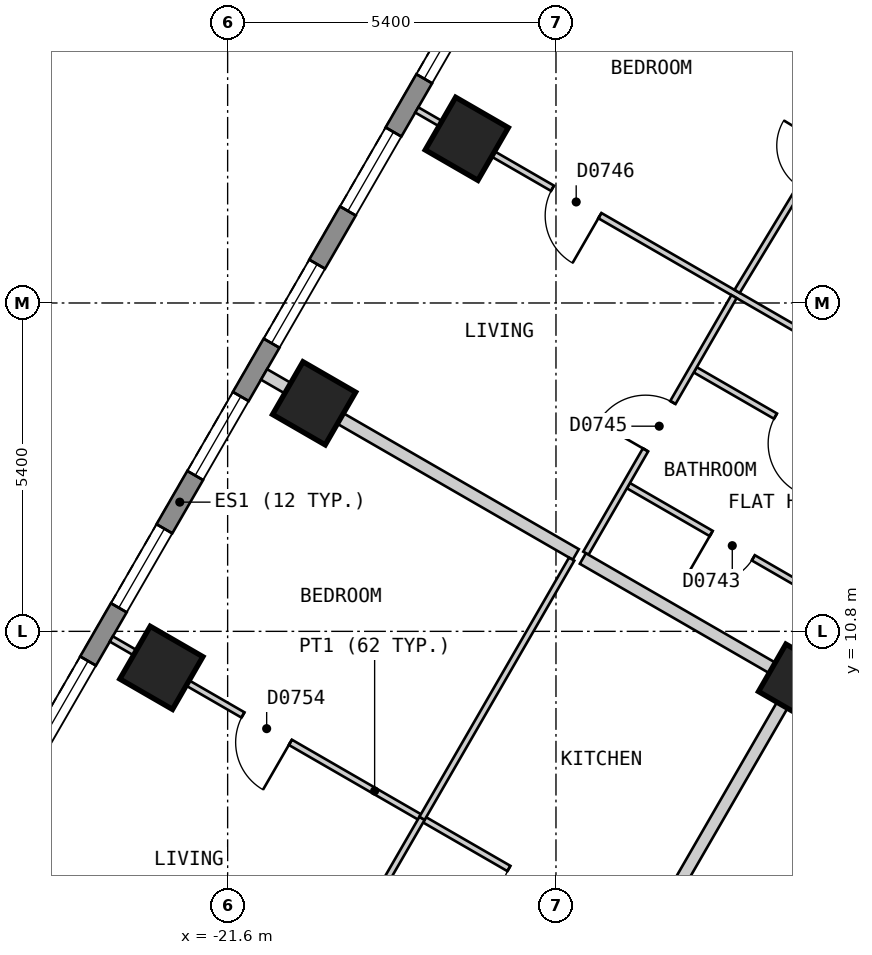
"""IFC4 building model, lengths in metres.
Left out: names, types, materials, properties, quantities, classifications, styles, units other than length and angle.
Written with IfcOpenShell. Run it as: python <this file> out.ifc"""

import sys

from ifc_helpers import new_model, si_unit, direction, frame, frame_2d, origin, origin_2d, place, context, subcontext, project, spatial, polyline, rectangle, outline, extrude, element, fill, save


model = new_model("IFC4")
c1 = context("Model", 3, precision=1e-05, world=origin(), true_north=direction((0.0, 1.0)))
c2 = subcontext(c1, "Body", "Model", "MODEL_VIEW")
j1 = project(units=[si_unit("LENGTHUNIT", "METRE"), si_unit("PLANEANGLEUNIT", "RADIAN")], contexts=[c1])
p1 = place(None, origin())
s1 = spatial("IfcSite", under=j1, at=p1, CompositionType="ELEMENT")
p2 = place(p1, origin())
s2 = spatial("IfcBuilding", under=s1, at=p2, CompositionType="ELEMENT")
p3 = place(p2, frame((0.0, 0.0, 105.0)))
s3 = spatial("IfcBuildingStorey", under=s2, at=p3, CompositionType="ELEMENT", Elevation=105.0)
for number, where, z_axis, x_axis in (
    (1, (-17.667, 18.9, 0.0), (0.0, 0.0, 1.0), (-0.5, -0.866, 0.0)),
    (2, (-20.178, 14.55, 0.0), (0.0, 0.0, 1.0), (-0.5, -0.866, 0.0)),
    (3, (-22.69, 10.2, 0.0), (0.0, 0.0, 1.0), (-0.5, -0.866, 0.0)),
):
    element("IfcColumn", number, at=place(p3, frame(where, z_axis=z_axis, x_axis=x_axis)), inside=s3, PredefinedType="COLUMN", context=c2, shape_type="SweptSolid", body=[
        extrude(rectangle(XDim=1.0, YDim=1.0, at=origin_2d()), origin(), (0.0, 0.0, 1.0), 3.0),
    ])
p4 = place(p3, frame((-12.254, 9.975, 0.0), z_axis=(0.0, 0.0, 1.0), x_axis=(-0.5, -0.866025403784, 0.0)))
e4 = element("IfcColumn", 4, at=p4, inside=s3, PredefinedType="COLUMN", context=c2, shape_type="SweptSolid", body=[
    extrude(rectangle(XDim=0.9, YDim=0.9, at=origin_2d()), origin(), (0.0, 0.0, 1.0), 3.0),
])
p5 = place(p3, frame((-15.747, 24.425, 0.0), z_axis=(0.0, 0.0, 1.0), x_axis=(-0.500027479704, -0.866009537788, 0.0)))
e5 = element("IfcWall", 5, at=p5, inside=s3, PredefinedType="SOLIDWALL", context=c2, shape_type="SweptSolid", body=[
    extrude(outline(polyline([(0.0, -0.15), (26.559, -0.15), (26.478, 0.15), (0.08, 0.15), (0.0, -0.15)])), origin(), (0.0, 0.0, 1.0), 2.6),
])
p6 = place(p5, frame((1.227, 0.0, 0.15)))
e6 = element("IfcOpeningElement", 6, at=p6, cuts=e5, PredefinedType="OPENING", context=c2, shape_type="SweptSolid", body=[
    extrude(rectangle(XDim=1.5, YDim=2.1, at=frame_2d((0.75, 1.05))), frame((0.0, 0.16, 0.0), z_axis=(0.0, -1.0, 0.0), x_axis=(1.0, 0.0, 0.0)), (0.0, 0.0, 1.0), 0.32),
])
p7 = place(p5, frame((3.739, 0.0, 0.15)))
e7 = element("IfcOpeningElement", 7, at=p7, cuts=e5, PredefinedType="OPENING", context=c2, shape_type="SweptSolid", body=[
    extrude(rectangle(XDim=1.5, YDim=2.1, at=frame_2d((0.75, 1.05))), frame((0.0, 0.16, 0.0), z_axis=(0.0, -1.0, 0.0), x_axis=(1.0, 0.0, 0.0)), (0.0, 0.0, 1.0), 0.32),
])
p8 = place(p5, frame((6.25, 0.0, 0.15)))
e8 = element("IfcOpeningElement", 8, at=p8, cuts=e5, PredefinedType="OPENING", context=c2, shape_type="SweptSolid", body=[
    extrude(rectangle(XDim=1.5, YDim=2.1, at=frame_2d((0.75, 1.05))), frame((0.0, 0.16, 0.0), z_axis=(0.0, -1.0, 0.0), x_axis=(1.0, 0.0, 0.0)), (0.0, 0.0, 1.0), 0.32),
])
p9 = place(p5, frame((8.761, 0.0, 0.15)))
e9 = element("IfcOpeningElement", 9, at=p9, cuts=e5, PredefinedType="OPENING", context=c2, shape_type="SweptSolid", body=[
    extrude(rectangle(XDim=1.5, YDim=2.1, at=frame_2d((0.75, 1.05))), frame((0.0, 0.16, 0.0), z_axis=(0.0, -1.0, 0.0), x_axis=(1.0, 0.0, 0.0)), (0.0, 0.0, 1.0), 0.32),
])
p10 = place(p5, frame((11.273, 0.0, 0.15)))
e10 = element("IfcOpeningElement", 10, at=p10, cuts=e5, PredefinedType="OPENING", context=c2, shape_type="SweptSolid", body=[
    extrude(rectangle(XDim=1.5, YDim=2.1, at=frame_2d((0.75, 1.05))), frame((0.0, 0.16, 0.0), z_axis=(0.0, -1.0, 0.0), x_axis=(1.0, 0.0, 0.0)), (0.0, 0.0, 1.0), 0.32),
])
p11 = place(p5, frame((13.785, 0.0, 0.15)))
e11 = element("IfcOpeningElement", 11, at=p11, cuts=e5, PredefinedType="OPENING", context=c2, shape_type="SweptSolid", body=[
    extrude(rectangle(XDim=1.5, YDim=2.1, at=frame_2d((0.75, 1.05))), frame((0.0, 0.16, 0.0), z_axis=(0.0, -1.0, 0.0), x_axis=(1.0, 0.0, 0.0)), (0.0, 0.0, 1.0), 0.32),
])
p12 = place(p5, frame((16.296, 0.0, 0.15)))
e12 = element("IfcOpeningElement", 12, at=p12, cuts=e5, PredefinedType="OPENING", context=c2, shape_type="SweptSolid", body=[
    extrude(rectangle(XDim=1.5, YDim=2.1, at=frame_2d((0.75, 1.05))), frame((0.0, 0.16, 0.0), z_axis=(0.0, -1.0, 0.0), x_axis=(1.0, 0.0, 0.0)), (0.0, 0.0, 1.0), 0.32),
])
p13 = place(p5, frame((18.807, 0.0, 0.15)))
e13 = element("IfcOpeningElement", 13, at=p13, cuts=e5, PredefinedType="OPENING", context=c2, shape_type="SweptSolid", body=[
    extrude(rectangle(XDim=1.5, YDim=2.1, at=frame_2d((0.75, 1.05))), frame((0.0, 0.16, 0.0), z_axis=(0.0, -1.0, 0.0), x_axis=(1.0, 0.0, 0.0)), (0.0, 0.0, 1.0), 0.32),
])
p14 = place(p5, frame((21.319, 0.0, 0.15)))
e14 = element("IfcOpeningElement", 14, at=p14, cuts=e5, PredefinedType="OPENING", context=c2, shape_type="SweptSolid", body=[
    extrude(rectangle(XDim=1.5, YDim=2.1, at=frame_2d((0.75, 1.05))), frame((0.0, 0.16, 0.0), z_axis=(0.0, -1.0, 0.0), x_axis=(1.0, 0.0, 0.0)), (0.0, 0.0, 1.0), 0.32),
])
p15 = place(p5, frame((23.831, 0.0, 0.15)))
e15 = element("IfcOpeningElement", 15, at=p15, cuts=e5, PredefinedType="OPENING", context=c2, shape_type="SweptSolid", body=[
    extrude(rectangle(XDim=1.5, YDim=2.1, at=frame_2d((0.75, 1.05))), frame((0.0, 0.16, 0.0), z_axis=(0.0, -1.0, 0.0), x_axis=(1.0, 0.0, 0.0)), (0.0, 0.0, 1.0), 0.32),
])
p16 = place(p3, frame((-16.05, -1.0, 0.0), z_axis=(0.0, 0.0, 1.0), x_axis=(0.499962449088, 0.866047082728, 0.0)))
e16 = element("IfcWall", 16, at=p16, inside=s3, PredefinedType="PARTITIONING", context=c2, shape_type="SweptSolid", body=[
    extrude(rectangle(XDim=10.391, YDim=0.2, at=frame_2d((5.195, 0.0))), origin(), (0.0, 0.0, 1.0), 2.6),
])
p17 = place(p16, frame((4.745, 0.0, 0.0)))
e17 = element("IfcOpeningElement", 17, at=p17, cuts=e16, PredefinedType="OPENING", context=c2, shape_type="SweptSolid", body=[
    extrude(rectangle(XDim=0.9, YDim=2.1, at=frame_2d((0.45, 1.05))), frame((0.0, 0.11, 0.0), z_axis=(0.0, -1.0, 0.0), x_axis=(1.0, 0.0, 0.0)), (0.0, 0.0, 1.0), 0.22),
])
p18 = place(p3, frame((-18.533, -0.901, 0.0), z_axis=(0.0, 0.0, 1.0), x_axis=(0.499981198768, 0.866036258409, 0.0)))
e18 = element("IfcWall", 18, at=p18, inside=s3, PredefinedType="PARTITIONING", context=c2, shape_type="SweptSolid", body=[
    extrude(rectangle(XDim=20.093, YDim=0.2, at=frame_2d((10.046, 0.0))), origin(), (0.0, 0.0, 1.0), 2.6),
])
p19 = place(p18, frame((14.57, 0.0, 0.0)))
e19 = element("IfcOpeningElement", 19, at=p19, cuts=e18, PredefinedType="OPENING", context=c2, shape_type="SweptSolid", body=[
    extrude(rectangle(XDim=1.0, YDim=2.1, at=frame_2d((0.5, 1.05))), frame((0.0, 0.11, 0.0), z_axis=(0.0, -1.0, 0.0), x_axis=(1.0, 0.0, 0.0)), (0.0, 0.0, 1.0), 0.22),
])
p20 = place(p18, frame((4.523, 0.0, 0.0)))
e20 = element("IfcOpeningElement", 20, at=p20, cuts=e18, PredefinedType="OPENING", context=c2, shape_type="SweptSolid", body=[
    extrude(rectangle(XDim=1.0, YDim=2.1, at=frame_2d((0.5, 1.05))), frame((0.0, 0.11, 0.0), z_axis=(0.0, -1.0, 0.0), x_axis=(1.0, 0.0, 0.0)), (0.0, 0.0, 1.0), 0.22),
])
p21 = place(p3, frame((-23.513, 10.675, 0.0), z_axis=(0.0, 0.0, 1.0), x_axis=(0.866041268327, -0.499972520799, 0.0)))
e21 = element("IfcWall", 21, at=p21, inside=s3, PredefinedType="PARTITIONING", context=c2, shape_type="SweptSolid", body=[
    extrude(rectangle(XDim=10.0, YDim=0.1, at=frame_2d((5.0, 0.0))), origin(), (0.0, 0.0, 1.0), 2.6),
])
p22 = place(p21, frame((7.55, 0.0, 0.0)))
e22 = element("IfcOpeningElement", 22, at=p22, cuts=e21, PredefinedType="OPENING", context=c2, shape_type="SweptSolid", body=[
    extrude(rectangle(XDim=0.9, YDim=2.1, at=frame_2d((0.45, 1.05))), frame((0.0, 0.06, 0.0), z_axis=(0.0, -1.0, 0.0), x_axis=(1.0, 0.0, 0.0)), (0.0, 0.0, 1.0), 0.12),
])
p23 = place(p21, frame((2.5, 0.0, 0.0)))
e23 = element("IfcOpeningElement", 23, at=p23, cuts=e21, PredefinedType="OPENING", context=c2, shape_type="SweptSolid", body=[
    extrude(rectangle(XDim=0.9, YDim=2.1, at=frame_2d((0.45, 1.05))), frame((0.0, 0.06, 0.0), z_axis=(0.0, -1.0, 0.0), x_axis=(1.0, 0.0, 0.0)), (0.0, 0.0, 1.0), 0.12),
])
p24 = place(p3, frame((-15.009, 13.196, 0.0), z_axis=(0.0, 0.0, 1.0), x_axis=(0.865916335424, -0.500188864377, 0.0)))
e24 = element("IfcWall", 24, at=p24, inside=s3, PredefinedType="PARTITIONING", context=c2, shape_type="SweptSolid", body=[
    extrude(rectangle(XDim=3.896, YDim=0.1, at=frame_2d((1.948, 0.0))), origin(), (0.0, 0.0, 1.0), 2.6),
])
p25 = place(p24, frame((1.573, 0.0, 0.0)))
e25 = element("IfcOpeningElement", 25, at=p25, cuts=e24, PredefinedType="OPENING", context=c2, shape_type="SweptSolid", body=[
    extrude(rectangle(XDim=0.8, YDim=2.1, at=frame_2d((0.4, 1.05))), frame((0.0, 0.06, 0.0), z_axis=(0.0, -1.0, 0.0), x_axis=(1.0, 0.0, 0.0)), (0.0, 0.0, 1.0), 0.12),
])
p26 = place(p3, frame((-13.909, 15.101, 0.0), z_axis=(0.0, 0.0, 1.0), x_axis=(0.866024880635, -0.500000906121, 0.0)))
e26 = element("IfcWall", 26, at=p26, inside=s3, PredefinedType="PARTITIONING", context=c2, shape_type="SweptSolid", body=[
    extrude(rectangle(XDim=3.896, YDim=0.1, at=frame_2d((1.948, 0.0))), origin(), (0.0, 0.0, 1.0), 2.6),
])
p27 = place(p26, frame((1.523, 0.0, 0.0)))
e27 = element("IfcOpeningElement", 27, at=p27, cuts=e26, PredefinedType="OPENING", context=c2, shape_type="SweptSolid", body=[
    extrude(rectangle(XDim=0.9, YDim=2.1, at=frame_2d((0.45, 1.05))), frame((0.0, 0.06, 0.0), z_axis=(0.0, -1.0, 0.0), x_axis=(1.0, 0.0, 0.0)), (0.0, 0.0, 1.0), 0.12),
])
p28 = place(p3, frame((-18.489, 19.375, 0.0), z_axis=(0.0, 0.0, 1.0), x_axis=(0.866016855193, -0.500014806302, 0.0)))
e28 = element("IfcWall", 28, at=p28, inside=s3, PredefinedType="PARTITIONING", context=c2, shape_type="SweptSolid", body=[
    extrude(rectangle(XDim=10.0, YDim=0.1, at=frame_2d((5.0, 0.0))), origin(), (0.0, 0.0, 1.0), 2.6),
])
p29 = place(p28, frame((2.577, 0.0, 0.0)))
e29 = element("IfcOpeningElement", 29, at=p29, cuts=e28, PredefinedType="OPENING", context=c2, shape_type="SweptSolid", body=[
    extrude(rectangle(XDim=0.9, YDim=2.1, at=frame_2d((0.45, 1.05))), frame((0.0, 0.06, 0.0), z_axis=(0.0, -1.0, 0.0), x_axis=(1.0, 0.0, 0.0)), (0.0, 0.0, 1.0), 0.12),
])
p30 = place(p3, frame((-13.221, 16.391, 0.0), z_axis=(0.0, 0.0, 1.0), x_axis=(0.518164725284, 0.855280841286, 0.0)))
e30 = element("IfcWall", 30, at=p30, inside=s3, PredefinedType="PARTITIONING", context=c2, shape_type="SweptSolid", body=[
    extrude(rectangle(XDim=4.74, YDim=0.1, at=frame_2d((2.37, 0.0))), origin(), (0.0, 0.0, 1.0), 2.6),
])
p31 = place(p30, frame((2.002, 0.0, 0.0)))
e31 = element("IfcOpeningElement", 31, at=p31, cuts=e30, PredefinedType="OPENING", context=c2, shape_type="SweptSolid", body=[
    extrude(rectangle(XDim=0.8, YDim=2.1, at=frame_2d((0.4, 1.05))), frame((0.0, 0.06, 0.0), z_axis=(0.0, -1.0, 0.0), x_axis=(1.0, 0.0, 0.0)), (0.0, 0.0, 1.0), 0.12),
])
p32 = place(p3, frame((-15.708, 12.085, 0.0), z_axis=(0.0, 0.0, 1.0), x_axis=(0.499943653708, 0.866057932887, 0.0)))
e32 = element("IfcWall", 32, at=p32, inside=s3, PredefinedType="PARTITIONING", context=c2, shape_type="SweptSolid", body=[
    extrude(rectangle(XDim=4.873, YDim=0.1, at=frame_2d((2.436, 0.0))), origin(), (0.0, 0.0, 1.0), 2.6),
])
p33 = place(p32, frame((1.962, 0.0, 0.0)))
e33 = element("IfcOpeningElement", 33, at=p33, cuts=e32, PredefinedType="OPENING", context=c2, shape_type="SweptSolid", body=[
    extrude(rectangle(XDim=0.9, YDim=2.1, at=frame_2d((0.45, 1.05))), frame((0.0, 0.06, 0.0), z_axis=(0.0, -1.0, 0.0), x_axis=(1.0, 0.0, 0.0)), (0.0, 0.0, 1.0), 0.12),
])
p34 = place(p3, frame((-20.89, 3.418, 0.0), z_axis=(0.0, 0.0, 1.0), x_axis=(0.500014231302, 0.866017187182, 0.0)))
e34 = element("IfcWall", 34, at=p34, inside=s3, PredefinedType="PARTITIONING", context=c2, shape_type="SweptSolid", body=[
    extrude(rectangle(XDim=4.973, YDim=0.1, at=frame_2d((2.487, 0.0))), origin(), (0.0, 0.0, 1.0), 2.6),
])
p35 = place(p34, frame((2.011, 0.0, 0.0)))
e35 = element("IfcOpeningElement", 35, at=p35, cuts=e34, PredefinedType="OPENING", context=c2, shape_type="SweptSolid", body=[
    extrude(rectangle(XDim=0.9, YDim=2.1, at=frame_2d((0.45, 1.05))), frame((0.0, 0.06, 0.0), z_axis=(0.0, -1.0, 0.0), x_axis=(1.0, 0.0, 0.0)), (0.0, 0.0, 1.0), 0.12),
])
p36 = place(p3, frame((-21.001, 15.025, 0.0), z_axis=(0.0, 0.0, 1.0), x_axis=(0.866031754707, -0.499988999718, 0.0)))
e36 = element("IfcWall", 36, at=p36, inside=s3, PredefinedType="PARTITIONING", context=c2, shape_type="SweptSolid", body=[
    extrude(rectangle(XDim=5.92, YDim=0.2, at=frame_2d((2.96, 0.0))), origin(), (0.0, 0.0, 1.0), 2.6),
])
p37 = place(p3, frame((-15.758, 11.998, 0.0), z_axis=(0.0, 0.0, 1.0), x_axis=(0.865987741337, -0.5000652276, 0.0)))
e37 = element("IfcWall", 37, at=p37, inside=s3, PredefinedType="PARTITIONING", context=c2, shape_type="SweptSolid", body=[
    extrude(rectangle(XDim=3.946, YDim=0.2, at=frame_2d((1.973, 0.0))), origin(), (0.0, 0.0, 1.0), 2.6),
])
p38 = place(p3, frame((-18.403, 7.725, 0.0), z_axis=(0.0, 0.0, 1.0), x_axis=(0.499995794706, 0.866027831699, 0.0)))
e38 = element("IfcWall", 38, at=p38, inside=s3, PredefinedType="PARTITIONING", context=c2, shape_type="SweptSolid", body=[
    extrude(rectangle(XDim=4.922, YDim=0.1, at=frame_2d((2.461, 0.0))), origin(), (0.0, 0.0, 1.0), 2.6),
])
p39 = place(p7, origin())
e39 = element("IfcWindow", 39, at=p39, inside=s3, PartitioningType="SINGLE_PANEL", PredefinedType="WINDOW", context=c2, shape_type="SweptSolid", body=[
    extrude(rectangle(XDim=1.5, YDim=2.1, at=frame_2d((0.75, 1.05))), frame((0.0, 0.03, 0.0), z_axis=(0.0, -1.0, 0.0), x_axis=(1.0, 0.0, 0.0)), (0.0, 0.0, 1.0), 0.06),
])
fill(e7, e39)
p40 = place(p8, origin())
e40 = element("IfcWindow", 40, at=p40, inside=s3, PartitioningType="SINGLE_PANEL", PredefinedType="WINDOW", context=c2, shape_type="SweptSolid", body=[
    extrude(rectangle(XDim=1.5, YDim=2.1, at=frame_2d((0.75, 1.05))), frame((0.0, 0.03, 0.0), z_axis=(0.0, -1.0, 0.0), x_axis=(1.0, 0.0, 0.0)), (0.0, 0.0, 1.0), 0.06),
])
fill(e8, e40)
p41 = place(p9, origin())
e41 = element("IfcWindow", 41, at=p41, inside=s3, PartitioningType="SINGLE_PANEL", PredefinedType="WINDOW", context=c2, shape_type="SweptSolid", body=[
    extrude(rectangle(XDim=1.5, YDim=2.1, at=frame_2d((0.75, 1.05))), frame((0.0, 0.03, 0.0), z_axis=(0.0, -1.0, 0.0), x_axis=(1.0, 0.0, 0.0)), (0.0, 0.0, 1.0), 0.06),
])
fill(e9, e41)
p42 = place(p10, origin())
e42 = element("IfcWindow", 42, at=p42, inside=s3, PartitioningType="SINGLE_PANEL", PredefinedType="WINDOW", context=c2, shape_type="SweptSolid", body=[
    extrude(rectangle(XDim=1.5, YDim=2.1, at=frame_2d((0.75, 1.05))), frame((0.0, 0.03, 0.0), z_axis=(0.0, -1.0, 0.0), x_axis=(1.0, 0.0, 0.0)), (0.0, 0.0, 1.0), 0.06),
])
fill(e10, e42)
p43 = place(p11, origin())
e43 = element("IfcWindow", 43, at=p43, inside=s3, PartitioningType="SINGLE_PANEL", PredefinedType="WINDOW", context=c2, shape_type="SweptSolid", body=[
    extrude(rectangle(XDim=1.5, YDim=2.1, at=frame_2d((0.75, 1.05))), frame((0.0, 0.03, 0.0), z_axis=(0.0, -1.0, 0.0), x_axis=(1.0, 0.0, 0.0)), (0.0, 0.0, 1.0), 0.06),
])
fill(e11, e43)
p44 = place(p12, origin())
e44 = element("IfcWindow", 44, at=p44, inside=s3, PartitioningType="SINGLE_PANEL", PredefinedType="WINDOW", context=c2, shape_type="SweptSolid", body=[
    extrude(rectangle(XDim=1.5, YDim=2.1, at=frame_2d((0.75, 1.05))), frame((0.0, 0.03, 0.0), z_axis=(0.0, -1.0, 0.0), x_axis=(1.0, 0.0, 0.0)), (0.0, 0.0, 1.0), 0.06),
])
fill(e12, e44)
p45 = place(p25, origin())
e45 = element("IfcDoor", 45, at=p45, inside=s3, OperationType="SINGLE_SWING_LEFT", PredefinedType="DOOR", context=c2, shape_type="SweptSolid", body=[
    extrude(rectangle(XDim=0.8, YDim=2.1, at=frame_2d((0.4, 1.05))), frame((0.0, 0.025, 0.0), z_axis=(0.0, -1.0, 0.0), x_axis=(1.0, 0.0, 0.0)), (0.0, 0.0, 1.0), 0.05),
])
fill(e25, e45)
p46 = place(p27, origin())
e46 = element("IfcDoor", 46, at=p46, inside=s3, OperationType="SINGLE_SWING_RIGHT", PredefinedType="DOOR", context=c2, shape_type="SweptSolid", body=[
    extrude(rectangle(XDim=0.9, YDim=2.1, at=frame_2d((0.45, 1.05))), frame((0.0, 0.025, 0.0), z_axis=(0.0, -1.0, 0.0), x_axis=(1.0, 0.0, 0.0)), (0.0, 0.0, 1.0), 0.05),
])
fill(e27, e46)
p47 = place(p33, origin())
e47 = element("IfcDoor", 47, at=p47, inside=s3, OperationType="SINGLE_SWING_LEFT", PredefinedType="DOOR", context=c2, shape_type="SweptSolid", body=[
    extrude(rectangle(XDim=0.9, YDim=2.1, at=frame_2d((0.45, 1.05))), frame((0.0, 0.025, 0.0), z_axis=(0.0, -1.0, 0.0), x_axis=(1.0, 0.0, 0.0)), (0.0, 0.0, 1.0), 0.05),
])
fill(e33, e47)
p48 = place(p29, origin())
e48 = element("IfcDoor", 48, at=p48, inside=s3, OperationType="SINGLE_SWING_RIGHT", PredefinedType="DOOR", context=c2, shape_type="SweptSolid", body=[
    extrude(rectangle(XDim=0.9, YDim=2.1, at=frame_2d((0.45, 1.05))), frame((0.0, 0.025, 0.0), z_axis=(0.0, -1.0, 0.0), x_axis=(1.0, 0.0, 0.0)), (0.0, 0.0, 1.0), 0.05),
])
fill(e29, e48)
p49 = place(p22, origin())
e49 = element("IfcDoor", 49, at=p49, inside=s3, OperationType="SINGLE_SWING_RIGHT", PredefinedType="DOOR", context=c2, shape_type="SweptSolid", body=[
    extrude(rectangle(XDim=0.9, YDim=2.1, at=frame_2d((0.45, 1.05))), frame((0.0, 0.025, 0.0), z_axis=(0.0, -1.0, 0.0), x_axis=(1.0, 0.0, 0.0)), (0.0, 0.0, 1.0), 0.05),
])
fill(e22, e49)
p50 = place(p23, origin())
e50 = element("IfcDoor", 50, at=p50, inside=s3, OperationType="SINGLE_SWING_RIGHT", PredefinedType="DOOR", context=c2, shape_type="SweptSolid", body=[
    extrude(rectangle(XDim=0.9, YDim=2.1, at=frame_2d((0.45, 1.05))), frame((0.0, 0.025, 0.0), z_axis=(0.0, -1.0, 0.0), x_axis=(1.0, 0.0, 0.0)), (0.0, 0.0, 1.0), 0.05),
])
fill(e23, e50)
save(model, sys.argv[1])
